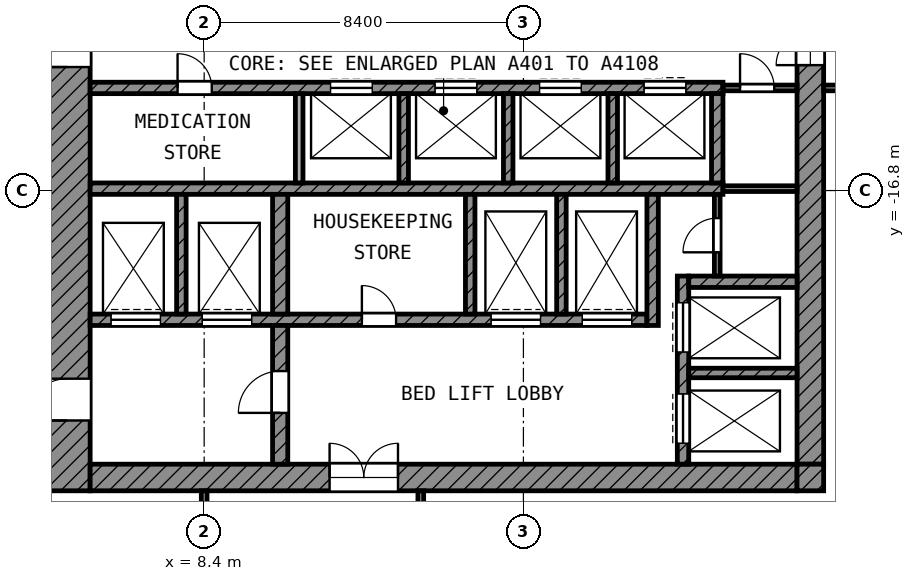
"""IFC4 building model, lengths in metres.
Left out: names, types, materials, properties, quantities, classifications, styles, units other than length and angle.
Written with IfcOpenShell. Run it as: python <this file> out.ifc"""

import sys

from ifc_helpers import new_model, si_unit, direction, frame, frame_2d, origin, place, context, subcontext, project, spatial, rectangle, extrude, element, fill, save


model = new_model("IFC4")
c1 = context("Model", 3, precision=1e-05, world=origin(), true_north=direction((0.0, 1.0)))
c2 = subcontext(c1, "Body", "Model", "MODEL_VIEW")
j1 = project(units=[si_unit("LENGTHUNIT", "METRE"), si_unit("PLANEANGLEUNIT", "RADIAN")], contexts=[c1])
p1 = place(None, origin())
s1 = spatial("IfcSite", under=j1, at=p1, CompositionType="ELEMENT")
p2 = place(p1, origin())
s2 = spatial("IfcBuilding", under=s1, at=p2, CompositionType="ELEMENT")
p3 = place(p2, frame((0.0, 0.0, 311.2)))
s3 = spatial("IfcBuildingStorey", under=s2, at=p3, CompositionType="ELEMENT", Elevation=311.2)
p4 = place(p3, frame((4.8, -24.7, 0.0), z_axis=(0.0, 0.0, 1.0), x_axis=(0.0, 1.0, 0.0)))
e1 = element("IfcWall", 1, at=p4, inside=s3, PredefinedType="SHEAR", context=c2, shape_type="SweptSolid", body=[
    extrude(rectangle(XDim=19.3, YDim=1.2, at=frame_2d((9.65, 0.0))), origin(), (0.0, 0.0, 1.0), 3.6),
])
p5 = place(p4, frame((11.15, 0.0, 0.0)))
e2 = element("IfcOpeningElement", 2, at=p5, cuts=e1, PredefinedType="OPENING", context=c2, shape_type="SweptSolid", body=[
    extrude(rectangle(XDim=1.1, YDim=2.1, at=frame_2d((0.55, 1.05))), frame((0.0, 0.61, 0.0), z_axis=(0.0, -1.0, 0.0), x_axis=(1.0, 0.0, 0.0)), (0.0, 0.0, 1.0), 1.22),
])
p6 = place(p4, frame((1.85, 0.0, 0.0)))
e3 = element("IfcOpeningElement", 3, at=p6, cuts=e1, PredefinedType="OPENING", context=c2, shape_type="SweptSolid", body=[
    extrude(rectangle(XDim=1.1, YDim=2.1, at=frame_2d((0.55, 1.05))), frame((0.0, 0.61, 0.0), z_axis=(0.0, -1.0, 0.0), x_axis=(1.0, 0.0, 0.0)), (0.0, 0.0, 1.0), 1.22),
])
p7 = place(p3, frame((24.35, -24.0, 0.0), z_axis=(0.0, 0.0, 1.0), x_axis=(0.0, 1.0, 0.0)))
e4 = element("IfcWall", 4, at=p7, inside=s3, PredefinedType="SHEAR", context=c2, shape_type="SweptSolid", body=[
    extrude(rectangle(XDim=18.6, YDim=0.7, at=frame_2d((9.3, 0.0))), origin(), (0.0, 0.0, 1.0), 3.6),
])
p8 = place(p7, frame((10.5, 0.0, 0.0)))
e5 = element("IfcOpeningElement", 5, at=p8, cuts=e4, PredefinedType="OPENING", context=c2, shape_type="SweptSolid", body=[
    extrude(rectangle(XDim=1.8, YDim=2.1, at=frame_2d((0.9, 1.05))), frame((0.0, 0.36, 0.0), z_axis=(0.0, -1.0, 0.0), x_axis=(1.0, 0.0, 0.0)), (0.0, 0.0, 1.0), 0.72),
])
p9 = place(p3, frame((5.4, -24.35, 0.0), z_axis=(0.0, 0.0, 1.0), x_axis=(1.0, 0.0, 0.0)))
e6 = element("IfcWall", 6, at=p9, inside=s3, PredefinedType="SHEAR", context=c2, shape_type="SweptSolid", body=[
    extrude(rectangle(XDim=18.6, YDim=0.7, at=frame_2d((9.3, 0.0))), origin(), (0.0, 0.0, 1.0), 3.6),
])
p10 = place(p9, frame((6.3, 0.0, 0.0)))
e7 = element("IfcOpeningElement", 7, at=p10, cuts=e6, PredefinedType="OPENING", context=c2, shape_type="SweptSolid", body=[
    extrude(rectangle(XDim=1.8, YDim=2.1, at=frame_2d((0.9, 1.05))), frame((0.0, 0.36, 0.0), z_axis=(0.0, -1.0, 0.0), x_axis=(1.0, 0.0, 0.0)), (0.0, 0.0, 1.0), 0.72),
])
p11 = place(p3, frame((24.35, -24.7, 0.0), z_axis=(0.0, 0.0, 1.0), x_axis=(0.0, 1.0, 0.0)))
e8 = element("IfcWall", 8, at=p11, inside=s3, PredefinedType="SHEAR", context=c2, shape_type="SweptSolid", body=[
    extrude(rectangle(XDim=0.7, YDim=0.7, at=frame_2d((0.35, 0.0))), origin(), (0.0, 0.0, 1.0), 3.6),
])
p12 = place(p3, frame((5.4, -14.1, 0.0), z_axis=(0.0, 0.0, 1.0), x_axis=(1.0, 0.0, 0.0)))
e9 = element("IfcWall", 9, at=p12, inside=s3, PredefinedType="SHEAR", context=c2, shape_type="SweptSolid", body=[
    extrude(rectangle(XDim=16.65, YDim=0.3, at=frame_2d((8.325, 0.0))), origin(), (0.0, 0.0, 1.0), 3.6),
])
p13 = place(p12, frame((6.325, 0.0, 0.0)))
e10 = element("IfcOpeningElement", 10, at=p13, cuts=e9, PredefinedType="OPENING", context=c2, shape_type="SweptSolid", body=[
    extrude(rectangle(XDim=1.1, YDim=2.1, at=frame_2d((0.55, 1.05))), frame((0.0, 0.16, 0.0), z_axis=(0.0, -1.0, 0.0), x_axis=(1.0, 0.0, 0.0)), (0.0, 0.0, 1.0), 0.32),
])
p14 = place(p12, frame((9.075, 0.0, 0.0)))
e11 = element("IfcOpeningElement", 11, at=p14, cuts=e9, PredefinedType="OPENING", context=c2, shape_type="SweptSolid", body=[
    extrude(rectangle(XDim=1.1, YDim=2.1, at=frame_2d((0.55, 1.05))), frame((0.0, 0.16, 0.0), z_axis=(0.0, -1.0, 0.0), x_axis=(1.0, 0.0, 0.0)), (0.0, 0.0, 1.0), 0.32),
])
p15 = place(p12, frame((11.825, 0.0, 0.0)))
e12 = element("IfcOpeningElement", 12, at=p15, cuts=e9, PredefinedType="OPENING", context=c2, shape_type="SweptSolid", body=[
    extrude(rectangle(XDim=1.1, YDim=2.1, at=frame_2d((0.55, 1.05))), frame((0.0, 0.16, 0.0), z_axis=(0.0, -1.0, 0.0), x_axis=(1.0, 0.0, 0.0)), (0.0, 0.0, 1.0), 0.32),
])
p16 = place(p12, frame((14.575, 0.0, 0.0)))
e13 = element("IfcOpeningElement", 13, at=p16, cuts=e9, PredefinedType="OPENING", context=c2, shape_type="SweptSolid", body=[
    extrude(rectangle(XDim=1.1, YDim=2.1, at=frame_2d((0.55, 1.05))), frame((0.0, 0.16, 0.0), z_axis=(0.0, -1.0, 0.0), x_axis=(1.0, 0.0, 0.0)), (0.0, 0.0, 1.0), 0.32),
])
p17 = place(p12, frame((2.3, 0.0, 0.0)))
e14 = element("IfcOpeningElement", 14, at=p17, cuts=e9, PredefinedType="OPENING", context=c2, shape_type="SweptSolid", body=[
    extrude(rectangle(XDim=0.9, YDim=2.1, at=frame_2d((0.45, 1.05))), frame((0.0, 0.16, 0.0), z_axis=(0.0, -1.0, 0.0), x_axis=(1.0, 0.0, 0.0)), (0.0, 0.0, 1.0), 0.32),
])
p18 = place(p3, frame((5.4, -16.75, 0.0), z_axis=(0.0, 0.0, 1.0), x_axis=(1.0, 0.0, 0.0)))
e15 = element("IfcWall", 15, at=p18, inside=s3, PredefinedType="SHEAR", context=c2, shape_type="SweptSolid", body=[
    extrude(rectangle(XDim=16.65, YDim=0.3, at=frame_2d((8.325, 0.0))), origin(), (0.0, 0.0, 1.0), 3.6),
])
p19 = place(p3, frame((5.4, -20.2, 0.0), z_axis=(0.0, 0.0, 1.0), x_axis=(1.0, 0.0, 0.0)))
e16 = element("IfcWall", 16, at=p19, inside=s3, PredefinedType="SHEAR", context=c2, shape_type="SweptSolid", body=[
    extrude(rectangle(XDim=14.65, YDim=0.3, at=frame_2d((7.325, 0.0))), origin(), (0.0, 0.0, 1.0), 3.6),
])
p20 = place(p19, frame((10.55, 0.0, 0.0)))
e17 = element("IfcOpeningElement", 17, at=p20, cuts=e16, PredefinedType="OPENING", context=c2, shape_type="SweptSolid", body=[
    extrude(rectangle(XDim=1.3, YDim=2.1, at=frame_2d((0.65, 1.05))), frame((0.0, 0.16, 0.0), z_axis=(0.0, -1.0, 0.0), x_axis=(1.0, 0.0, 0.0)), (0.0, 0.0, 1.0), 0.32),
])
p21 = place(p19, frame((12.95, 0.0, 0.0)))
e18 = element("IfcOpeningElement", 18, at=p21, cuts=e16, PredefinedType="OPENING", context=c2, shape_type="SweptSolid", body=[
    extrude(rectangle(XDim=1.3, YDim=2.1, at=frame_2d((0.65, 1.05))), frame((0.0, 0.16, 0.0), z_axis=(0.0, -1.0, 0.0), x_axis=(1.0, 0.0, 0.0)), (0.0, 0.0, 1.0), 0.32),
])
p22 = place(p19, frame((0.55, 0.0, 0.0)))
e19 = element("IfcOpeningElement", 19, at=p22, cuts=e16, PredefinedType="OPENING", context=c2, shape_type="SweptSolid", body=[
    extrude(rectangle(XDim=1.3, YDim=2.1, at=frame_2d((0.65, 1.05))), frame((0.0, 0.16, 0.0), z_axis=(0.0, -1.0, 0.0), x_axis=(1.0, 0.0, 0.0)), (0.0, 0.0, 1.0), 0.32),
])
p23 = place(p19, frame((2.95, 0.0, 0.0)))
e20 = element("IfcOpeningElement", 20, at=p23, cuts=e16, PredefinedType="OPENING", context=c2, shape_type="SweptSolid", body=[
    extrude(rectangle(XDim=1.3, YDim=2.1, at=frame_2d((0.65, 1.05))), frame((0.0, 0.16, 0.0), z_axis=(0.0, -1.0, 0.0), x_axis=(1.0, 0.0, 0.0)), (0.0, 0.0, 1.0), 0.32),
])
p24 = place(p19, frame((7.15, 0.0, 0.0)))
e21 = element("IfcOpeningElement", 21, at=p24, cuts=e16, PredefinedType="OPENING", context=c2, shape_type="SweptSolid", body=[
    extrude(rectangle(XDim=0.9, YDim=2.1, at=frame_2d((0.45, 1.05))), frame((0.0, 0.16, 0.0), z_axis=(0.0, -1.0, 0.0), x_axis=(1.0, 0.0, 0.0)), (0.0, 0.0, 1.0), 0.32),
])
p25 = place(p3, frame((10.4, -24.0, 0.0), z_axis=(0.0, 0.0, 1.0), x_axis=(0.0, 1.0, 0.0)))
e22 = element("IfcWall", 22, at=p25, inside=s3, PredefinedType="SHEAR", context=c2, shape_type="SweptSolid", body=[
    extrude(rectangle(XDim=3.65, YDim=0.4, at=frame_2d((1.825, 0.0))), origin(), (0.0, 0.0, 1.0), 3.6),
])
p26 = place(p25, frame((1.35, 0.0, 0.0)))
e23 = element("IfcOpeningElement", 23, at=p26, cuts=e22, PredefinedType="OPENING", context=c2, shape_type="SweptSolid", body=[
    extrude(rectangle(XDim=1.1, YDim=2.1, at=frame_2d((0.55, 1.05))), frame((0.0, 0.21, 0.0), z_axis=(0.0, -1.0, 0.0), x_axis=(1.0, 0.0, 0.0)), (0.0, 0.0, 1.0), 0.42),
])
p27 = place(p3, frame((10.4, -20.05, 0.0), z_axis=(0.0, 0.0, 1.0), x_axis=(0.0, 1.0, 0.0)))
e24 = element("IfcWall", 24, at=p27, inside=s3, PredefinedType="SHEAR", context=c2, shape_type="SweptSolid", body=[
    extrude(rectangle(XDim=3.15, YDim=0.4, at=frame_2d((1.575, 0.0))), origin(), (0.0, 0.0, 1.0), 3.6),
])
p28 = place(p3, frame((20.2, -20.35, 0.0), z_axis=(0.0, 0.0, 1.0), x_axis=(0.0, 1.0, 0.0)))
e25 = element("IfcWall", 25, at=p28, inside=s3, PredefinedType="SHEAR", context=c2, shape_type="SweptSolid", body=[
    extrude(rectangle(XDim=3.45, YDim=0.3, at=frame_2d((1.725, 0.0))), origin(), (0.0, 0.0, 1.0), 3.6),
])
p29 = place(p3, frame((21.9, -16.6, 0.0), z_axis=(0.0, 0.0, 1.0), x_axis=(0.0, 1.0, 0.0)))
e26 = element("IfcWall", 26, at=p29, inside=s3, PredefinedType="SHEAR", context=c2, shape_type="SweptSolid", body=[
    extrude(rectangle(XDim=2.35, YDim=0.3, at=frame_2d((1.175, 0.0))), origin(), (0.0, 0.0, 1.0), 3.6),
])
p30 = place(p3, frame((21.15, -19.2, 0.0), z_axis=(0.0, 0.0, 1.0), x_axis=(1.0, 0.0, 0.0)))
e27 = element("IfcWall", 27, at=p30, inside=s3, PredefinedType="SHEAR", context=c2, shape_type="SweptSolid", body=[
    extrude(rectangle(XDim=2.85, YDim=0.3, at=frame_2d((1.425, 0.0))), origin(), (0.0, 0.0, 1.0), 3.6),
])
p31 = place(p3, frame((21.0, -24.0, 0.0), z_axis=(0.0, 0.0, 1.0), x_axis=(0.0, 1.0, 0.0)))
e28 = element("IfcWall", 28, at=p31, inside=s3, PredefinedType="SHEAR", context=c2, shape_type="SweptSolid", body=[
    extrude(rectangle(XDim=4.95, YDim=0.3, at=frame_2d((2.475, 0.0))), origin(), (0.0, 0.0, 1.0), 3.6),
])
p32 = place(p31, frame((2.95, 0.0, 0.0)))
e29 = element("IfcOpeningElement", 29, at=p32, cuts=e28, PredefinedType="OPENING", context=c2, shape_type="SweptSolid", body=[
    extrude(rectangle(XDim=1.3, YDim=2.1, at=frame_2d((0.65, 1.05))), frame((0.0, 0.16, 0.0), z_axis=(0.0, -1.0, 0.0), x_axis=(1.0, 0.0, 0.0)), (0.0, 0.0, 1.0), 0.32),
])
p33 = place(p31, frame((0.55, 0.0, 0.0)))
e30 = element("IfcOpeningElement", 30, at=p33, cuts=e28, PredefinedType="OPENING", context=c2, shape_type="SweptSolid", body=[
    extrude(rectangle(XDim=1.3, YDim=2.1, at=frame_2d((0.65, 1.05))), frame((0.0, 0.16, 0.0), z_axis=(0.0, -1.0, 0.0), x_axis=(1.0, 0.0, 0.0)), (0.0, 0.0, 1.0), 0.32),
])
p34 = place(p3, frame((21.15, -21.6, 0.0), z_axis=(0.0, 0.0, 1.0), x_axis=(1.0, 0.0, 0.0)))
e31 = element("IfcWall", 31, at=p34, inside=s3, PredefinedType="SHEAR", context=c2, shape_type="SweptSolid", body=[
    extrude(rectangle(XDim=2.85, YDim=0.25, at=frame_2d((1.425, 0.0))), origin(), (0.0, 0.0, 1.0), 3.6),
])
for number, where, z_axis, x_axis in (
    (32, (7.8, -20.05, 0.0), (0.0, 0.0, 1.0), (0.0, 1.0, 0.0)),
    (33, (15.4, -20.05, 0.0), (0.0, 0.0, 1.0), (0.0, 1.0, 0.0)),
    (34, (17.8, -20.05, 0.0), (0.0, 0.0, 1.0), (0.0, 1.0, 0.0)),
):
    element("IfcWall", number, at=place(p3, frame(where, z_axis=z_axis, x_axis=x_axis)), inside=s3, PredefinedType="SHEAR", context=c2, shape_type="SweptSolid", body=[
        extrude(rectangle(XDim=3.15, YDim=0.25, at=frame_2d((1.575, 0.0))), origin(), (0.0, 0.0, 1.0), 3.6),
    ])
p35 = place(p3, frame((10.9, -16.6, 0.0), z_axis=(0.0, 0.0, 1.0), x_axis=(0.0, 1.0, 0.0)))
e35 = element("IfcWall", 35, at=p35, inside=s3, PredefinedType="PARTITIONING", context=c2, shape_type="SweptSolid", body=[
    extrude(rectangle(XDim=2.35, YDim=0.2, at=frame_2d((1.175, 0.0))), origin(), (0.0, 0.0, 1.0), 3.6),
])
for number, where, z_axis, x_axis in (
    (36, (13.65, -16.6, 0.0), (0.0, 0.0, 1.0), (0.0, 1.0, 0.0)),
    (37, (16.4, -16.6, 0.0), (0.0, 0.0, 1.0), (0.0, 1.0, 0.0)),
    (38, (19.15, -16.6, 0.0), (0.0, 0.0, 1.0), (0.0, 1.0, 0.0)),
):
    element("IfcWall", number, at=place(p3, frame(where, z_axis=z_axis, x_axis=x_axis)), inside=s3, PredefinedType="SHEAR", context=c2, shape_type="SweptSolid", body=[
        extrude(rectangle(XDim=2.35, YDim=0.25, at=frame_2d((1.175, 0.0))), origin(), (0.0, 0.0, 1.0), 3.6),
    ])
p36 = place(p3, frame((21.9, -19.05, 0.0), z_axis=(0.0, 0.0, 1.0), x_axis=(0.0, 1.0, 0.0)))
e39 = element("IfcWall", 39, at=p36, inside=s3, PredefinedType="PARTITIONING", context=c2, shape_type="SweptSolid", body=[
    extrude(rectangle(XDim=2.15, YDim=0.15, at=frame_2d((1.075, 0.0))), origin(), (0.0, 0.0, 1.0), 3.6),
])
p37 = place(p36, frame((0.625, 0.0, 0.0)))
e40 = element("IfcOpeningElement", 40, at=p37, cuts=e39, PredefinedType="OPENING", context=c2, shape_type="SweptSolid", body=[
    extrude(rectangle(XDim=0.9, YDim=2.1, at=frame_2d((0.45, 1.05))), frame((0.0, 0.085, 0.0), z_axis=(0.0, -1.0, 0.0), x_axis=(1.0, 0.0, 0.0)), (0.0, 0.0, 1.0), 0.17),
])
p38 = place(p3, frame((22.05, -16.75, 0.0), z_axis=(0.0, 0.0, 1.0), x_axis=(1.0, 0.0, 0.0)))
e41 = element("IfcWall", 41, at=p38, inside=s3, PredefinedType="PARTITIONING", context=c2, shape_type="SweptSolid", body=[
    extrude(rectangle(XDim=1.95, YDim=0.15, at=frame_2d((0.975, 0.0))), origin(), (0.0, 0.0, 1.0), 3.6),
])
p39 = place(p3, frame((22.05, -14.1, 0.0), z_axis=(0.0, 0.0, 1.0), x_axis=(1.0, 0.0, 0.0)))
e42 = element("IfcWall", 42, at=p39, inside=s3, PredefinedType="PARTITIONING", context=c2, shape_type="SweptSolid", body=[
    extrude(rectangle(XDim=1.95, YDim=0.15, at=frame_2d((0.975, 0.0))), origin(), (0.0, 0.0, 1.0), 3.6),
])
p40 = place(p39, frame((0.45, 0.0, 0.0)))
e43 = element("IfcOpeningElement", 43, at=p40, cuts=e42, PredefinedType="OPENING", context=c2, shape_type="SweptSolid", body=[
    extrude(rectangle(XDim=0.9, YDim=2.1, at=frame_2d((0.45, 1.05))), frame((0.0, 0.085, 0.0), z_axis=(0.0, -1.0, 0.0), x_axis=(1.0, 0.0, 0.0)), (0.0, 0.0, 1.0), 0.17),
])
p41 = place(p3, frame((24.7, -14.1, 0.0), z_axis=(0.0, 0.0, 1.0), x_axis=(1.0, 0.0, 0.0)))
e44 = element("IfcWall", 44, at=p41, inside=s3, PredefinedType="PARTITIONING", context=c2, shape_type="SweptSolid", body=[
    extrude(rectangle(XDim=4.625, YDim=0.15, at=frame_2d((2.312, 0.0))), origin(), (0.0, 0.0, 1.0), 3.6),
])
p42 = place(p41, frame((1.85, 0.0, 0.0)))
e45 = element("IfcOpeningElement", 45, at=p42, cuts=e44, PredefinedType="OPENING", context=c2, shape_type="SweptSolid", body=[
    extrude(rectangle(XDim=1.5, YDim=2.1, at=frame_2d((0.75, 1.05))), frame((0.0, 0.085, 0.0), z_axis=(0.0, -1.0, 0.0), x_axis=(1.0, 0.0, 0.0)), (0.0, 0.0, 1.0), 0.17),
])
p43 = place(p3, frame((8.4, -31.957, 0.0), z_axis=(0.0, 0.0, 1.0), x_axis=(0.0, 1.0, 0.0)))
e46 = element("IfcWall", 46, at=p43, inside=s3, PredefinedType="PARTITIONING", context=c2, shape_type="SweptSolid", body=[
    extrude(rectangle(XDim=7.257, YDim=0.15, at=frame_2d((3.628, 0.0))), origin(), (0.0, 0.0, 1.0), 3.6),
])
p44 = place(p43, frame((4.007, 0.0, 0.0)))
e47 = element("IfcOpeningElement", 47, at=p44, cuts=e46, PredefinedType="OPENING", context=c2, shape_type="SweptSolid", body=[
    extrude(rectangle(XDim=1.0, YDim=2.1, at=frame_2d((0.5, 1.05))), frame((0.0, 0.085, 0.0), z_axis=(0.0, -1.0, 0.0), x_axis=(1.0, 0.0, 0.0)), (0.0, 0.0, 1.0), 0.17),
])
p45 = place(p3, frame((14.1, -29.325, 0.0), z_axis=(0.0, 0.0, 1.0), x_axis=(0.0, 1.0, 0.0)))
e48 = element("IfcWall", 48, at=p45, inside=s3, PredefinedType="PARTITIONING", context=c2, shape_type="SweptSolid", body=[
    extrude(rectangle(XDim=4.625, YDim=0.15, at=frame_2d((2.312, 0.0))), origin(), (0.0, 0.0, 1.0), 3.6),
])
p46 = place(p13, origin())
e49 = element("IfcDoor", 49, at=p46, inside=s3, OperationType="DOUBLE_DOOR_SLIDING", PredefinedType="DOOR", context=c2, shape_type="SweptSolid", body=[
    extrude(rectangle(XDim=1.1, YDim=2.1, at=frame_2d((0.55, 1.05))), frame((0.0, 0.025, 0.0), z_axis=(0.0, -1.0, 0.0), x_axis=(1.0, 0.0, 0.0)), (0.0, 0.0, 1.0), 0.05),
])
fill(e10, e49)
p47 = place(p14, origin())
e50 = element("IfcDoor", 50, at=p47, inside=s3, OperationType="DOUBLE_DOOR_SLIDING", PredefinedType="DOOR", context=c2, shape_type="SweptSolid", body=[
    extrude(rectangle(XDim=1.1, YDim=2.1, at=frame_2d((0.55, 1.05))), frame((0.0, 0.025, 0.0), z_axis=(0.0, -1.0, 0.0), x_axis=(1.0, 0.0, 0.0)), (0.0, 0.0, 1.0), 0.05),
])
fill(e11, e50)
p48 = place(p15, origin())
e51 = element("IfcDoor", 51, at=p48, inside=s3, OperationType="DOUBLE_DOOR_SLIDING", PredefinedType="DOOR", context=c2, shape_type="SweptSolid", body=[
    extrude(rectangle(XDim=1.1, YDim=2.1, at=frame_2d((0.55, 1.05))), frame((0.0, 0.025, 0.0), z_axis=(0.0, -1.0, 0.0), x_axis=(1.0, 0.0, 0.0)), (0.0, 0.0, 1.0), 0.05),
])
fill(e12, e51)
p49 = place(p16, origin())
e52 = element("IfcDoor", 52, at=p49, inside=s3, OperationType="DOUBLE_DOOR_SLIDING", PredefinedType="DOOR", context=c2, shape_type="SweptSolid", body=[
    extrude(rectangle(XDim=1.1, YDim=2.1, at=frame_2d((0.55, 1.05))), frame((0.0, 0.025, 0.0), z_axis=(0.0, -1.0, 0.0), x_axis=(1.0, 0.0, 0.0)), (0.0, 0.0, 1.0), 0.05),
])
fill(e13, e52)
p50 = place(p32, origin())
e53 = element("IfcDoor", 53, at=p50, inside=s3, OperationType="DOUBLE_DOOR_SLIDING", PredefinedType="DOOR", context=c2, shape_type="SweptSolid", body=[
    extrude(rectangle(XDim=1.3, YDim=2.1, at=frame_2d((0.65, 1.05))), frame((0.0, 0.025, 0.0), z_axis=(0.0, -1.0, 0.0), x_axis=(1.0, 0.0, 0.0)), (0.0, 0.0, 1.0), 0.05),
])
fill(e29, e53)
p51 = place(p33, origin())
e54 = element("IfcDoor", 54, at=p51, inside=s3, OperationType="DOUBLE_DOOR_SLIDING", PredefinedType="DOOR", context=c2, shape_type="SweptSolid", body=[
    extrude(rectangle(XDim=1.3, YDim=2.1, at=frame_2d((0.65, 1.05))), frame((0.0, 0.025, 0.0), z_axis=(0.0, -1.0, 0.0), x_axis=(1.0, 0.0, 0.0)), (0.0, 0.0, 1.0), 0.05),
])
fill(e30, e54)
p52 = place(p20, origin())
e55 = element("IfcDoor", 55, at=p52, inside=s3, OperationType="DOUBLE_DOOR_SLIDING", PredefinedType="DOOR", context=c2, shape_type="SweptSolid", body=[
    extrude(rectangle(XDim=1.3, YDim=2.1, at=frame_2d((0.65, 1.05))), frame((0.0, 0.025, 0.0), z_axis=(0.0, -1.0, 0.0), x_axis=(1.0, 0.0, 0.0)), (0.0, 0.0, 1.0), 0.05),
])
fill(e17, e55)
p53 = place(p21, origin())
e56 = element("IfcDoor", 56, at=p53, inside=s3, OperationType="DOUBLE_DOOR_SLIDING", PredefinedType="DOOR", context=c2, shape_type="SweptSolid", body=[
    extrude(rectangle(XDim=1.3, YDim=2.1, at=frame_2d((0.65, 1.05))), frame((0.0, 0.025, 0.0), z_axis=(0.0, -1.0, 0.0), x_axis=(1.0, 0.0, 0.0)), (0.0, 0.0, 1.0), 0.05),
])
fill(e18, e56)
p54 = place(p22, origin())
e57 = element("IfcDoor", 57, at=p54, inside=s3, OperationType="DOUBLE_DOOR_SLIDING", PredefinedType="DOOR", context=c2, shape_type="SweptSolid", body=[
    extrude(rectangle(XDim=1.3, YDim=2.1, at=frame_2d((0.65, 1.05))), frame((0.0, 0.025, 0.0), z_axis=(0.0, -1.0, 0.0), x_axis=(1.0, 0.0, 0.0)), (0.0, 0.0, 1.0), 0.05),
])
fill(e19, e57)
p55 = place(p23, origin())
e58 = element("IfcDoor", 58, at=p55, inside=s3, OperationType="DOUBLE_DOOR_SLIDING", PredefinedType="DOOR", context=c2, shape_type="SweptSolid", body=[
    extrude(rectangle(XDim=1.3, YDim=2.1, at=frame_2d((0.65, 1.05))), frame((0.0, 0.025, 0.0), z_axis=(0.0, -1.0, 0.0), x_axis=(1.0, 0.0, 0.0)), (0.0, 0.0, 1.0), 0.05),
])
fill(e20, e58)
p56 = place(p5, origin())
e59 = element("IfcDoor", 59, at=p56, inside=s3, OperationType="SINGLE_SWING_LEFT", PredefinedType="DOOR", context=c2, shape_type="SweptSolid", body=[
    extrude(rectangle(XDim=1.1, YDim=2.1, at=frame_2d((0.55, 1.05))), frame((0.0, 0.025, 0.0), z_axis=(0.0, -1.0, 0.0), x_axis=(1.0, 0.0, 0.0)), (0.0, 0.0, 1.0), 0.05),
])
fill(e2, e59)
p57 = place(p6, origin())
e60 = element("IfcDoor", 60, at=p57, inside=s3, OperationType="SINGLE_SWING_LEFT", PredefinedType="DOOR", context=c2, shape_type="SweptSolid", body=[
    extrude(rectangle(XDim=1.1, YDim=2.1, at=frame_2d((0.55, 1.05))), frame((0.0, 0.025, 0.0), z_axis=(0.0, -1.0, 0.0), x_axis=(1.0, 0.0, 0.0)), (0.0, 0.0, 1.0), 0.05),
])
fill(e3, e60)
p58 = place(p26, origin())
e61 = element("IfcDoor", 61, at=p58, inside=s3, OperationType="SINGLE_SWING_LEFT", PredefinedType="DOOR", context=c2, shape_type="SweptSolid", body=[
    extrude(rectangle(XDim=1.1, YDim=2.1, at=frame_2d((0.55, 1.05))), frame((0.0, 0.025, 0.0), z_axis=(0.0, -1.0, 0.0), x_axis=(1.0, 0.0, 0.0)), (0.0, 0.0, 1.0), 0.05),
])
fill(e23, e61)
p59 = place(p8, origin())
e62 = element("IfcDoor", 62, at=p59, inside=s3, OperationType="DOUBLE_DOOR_SINGLE_SWING", PredefinedType="DOOR", context=c2, shape_type="SweptSolid", body=[
    extrude(rectangle(XDim=1.8, YDim=2.1, at=frame_2d((0.9, 1.05))), frame((0.0, 0.025, 0.0), z_axis=(0.0, -1.0, 0.0), x_axis=(1.0, 0.0, 0.0)), (0.0, 0.0, 1.0), 0.05),
])
fill(e5, e62)
p60 = place(p10, origin())
e63 = element("IfcDoor", 63, at=p60, inside=s3, OperationType="DOUBLE_DOOR_SINGLE_SWING", PredefinedType="DOOR", context=c2, shape_type="SweptSolid", body=[
    extrude(rectangle(XDim=1.8, YDim=2.1, at=frame_2d((0.9, 1.05))), frame((0.0, 0.025, 0.0), z_axis=(0.0, -1.0, 0.0), x_axis=(1.0, 0.0, 0.0)), (0.0, 0.0, 1.0), 0.05),
])
fill(e7, e63)
p61 = place(p40, origin())
e64 = element("IfcDoor", 64, at=p61, inside=s3, OperationType="SINGLE_SWING_LEFT", PredefinedType="DOOR", context=c2, shape_type="SweptSolid", body=[
    extrude(rectangle(XDim=0.9, YDim=2.1, at=frame_2d((0.45, 1.05))), frame((0.0, 0.025, 0.0), z_axis=(0.0, -1.0, 0.0), x_axis=(1.0, 0.0, 0.0)), (0.0, 0.0, 1.0), 0.05),
])
fill(e43, e64)
p62 = place(p37, origin())
e65 = element("IfcDoor", 65, at=p62, inside=s3, OperationType="SINGLE_SWING_LEFT", PredefinedType="DOOR", context=c2, shape_type="SweptSolid", body=[
    extrude(rectangle(XDim=0.9, YDim=2.1, at=frame_2d((0.45, 1.05))), frame((0.0, 0.025, 0.0), z_axis=(0.0, -1.0, 0.0), x_axis=(1.0, 0.0, 0.0)), (0.0, 0.0, 1.0), 0.05),
])
fill(e40, e65)
p63 = place(p24, origin())
e66 = element("IfcDoor", 66, at=p63, inside=s3, OperationType="SINGLE_SWING_LEFT", PredefinedType="DOOR", context=c2, shape_type="SweptSolid", body=[
    extrude(rectangle(XDim=0.9, YDim=2.1, at=frame_2d((0.45, 1.05))), frame((0.0, 0.025, 0.0), z_axis=(0.0, -1.0, 0.0), x_axis=(1.0, 0.0, 0.0)), (0.0, 0.0, 1.0), 0.05),
])
fill(e21, e66)
p64 = place(p17, origin())
e67 = element("IfcDoor", 67, at=p64, inside=s3, OperationType="SINGLE_SWING_LEFT", PredefinedType="DOOR", context=c2, shape_type="SweptSolid", body=[
    extrude(rectangle(XDim=0.9, YDim=2.1, at=frame_2d((0.45, 1.05))), frame((0.0, 0.025, 0.0), z_axis=(0.0, -1.0, 0.0), x_axis=(1.0, 0.0, 0.0)), (0.0, 0.0, 1.0), 0.05),
])
fill(e14, e67)
save(model, sys.argv[1])
